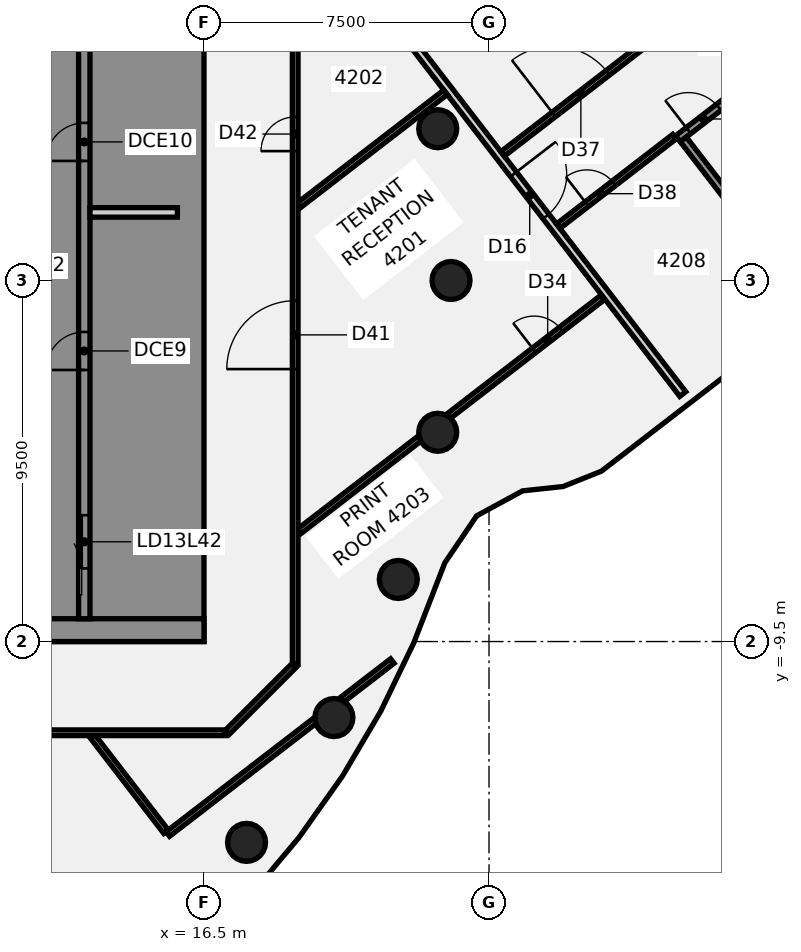
"""IFC4 building model, lengths in metres.
Left out: names, types, materials, properties, quantities, classifications, styles, units other than length and angle.
Written with IfcOpenShell. Run it as: python <this file> out.ifc"""

import sys

from ifc_helpers import new_model, si_unit, direction, frame, frame_2d, origin, origin_2d, place, context, subcontext, project, spatial, polyline, rectangle, circle, outline, extrude, element, fill, save


model = new_model("IFC4")
c1 = context("Model", 3, precision=1e-05, world=origin(), true_north=direction((0.0, 1.0)))
c2 = subcontext(c1, "Body", "Model", "MODEL_VIEW")
j1 = project(units=[si_unit("LENGTHUNIT", "METRE"), si_unit("PLANEANGLEUNIT", "RADIAN")], contexts=[c1])
p1 = place(None, origin())
s1 = spatial("IfcSite", under=j1, at=p1, CompositionType="ELEMENT")
p2 = place(p1, origin())
s2 = spatial("IfcBuilding", under=s1, at=p2, CompositionType="ELEMENT")
p3 = place(p2, frame((0.0, 0.0, 170.5)))
s3 = spatial("IfcBuildingStorey", under=s2, at=p3, CompositionType="ELEMENT", Elevation=170.5)
for number, where, z_axis, x_axis in (
    (1, (23.0, 0.0, -0.14), (0.0, 0.0, 1.0), (1.0, 0.0, 0.0)),
    (2, (22.651, 3.994, -0.14), (0.0, 0.0, 1.0), (1.0, 0.0, 0.0)),
    (3, (17.619, -14.784, -0.14), (0.0, 0.0, 1.0), (1.0, 0.0, 0.0)),
    (4, (19.919, -11.5, -0.14), (0.0, 0.0, 1.0), (1.0, 0.0, 0.0)),
    (5, (21.613, -7.866, -0.14), (0.0, 0.0, 1.0), (1.0, 0.0, 0.0)),
    (6, (22.651, -3.994, -0.14), (0.0, 0.0, 1.0), (1.0, 0.0, 0.0)),
):
    element("IfcColumn", number, at=place(p3, frame(where, z_axis=z_axis, x_axis=x_axis)), inside=s3, PredefinedType="COLUMN", context=c2, shape_type="SweptSolid", body=[
        extrude(circle(Radius=0.5, at=origin_2d()), origin(), (0.0, 0.0, 1.0), 3.75),
    ])
p4 = place(p3, frame((13.574, -12.003, 0.0), z_axis=(0.0, 0.0, 1.0), x_axis=(0.61027454424, -0.79218999025, 0.0)))
e7 = element("IfcWall", 7, at=p4, inside=s3, PredefinedType="PARTITIONING", context=c2, shape_type="SweptSolid", body=[
    extrude(rectangle(XDim=3.159, YDim=0.15, at=frame_2d((1.58, 0.0))), origin(), (0.0, 0.0, 1.0), 3.01),
])
p5 = place(p3, frame((20.409, 8.292, 0.0), z_axis=(0.0, 0.0, 1.0), x_axis=(0.610264945107, -0.792197384983, 0.0)))
e8 = element("IfcWall", 8, at=p5, inside=s3, PredefinedType="PARTITIONING", context=c2, shape_type="SweptSolid", body=[
    extrude(rectangle(XDim=14.239, YDim=0.2, at=frame_2d((7.12, 0.0))), origin(), (0.0, 0.0, 1.0), 3.01),
])
p6 = place(p5, frame((6.94, 0.0, 0.0)))
e9 = element("IfcOpeningElement", 9, at=p6, cuts=e8, PredefinedType="OPENING", context=c2, shape_type="SweptSolid", body=[
    extrude(rectangle(XDim=1.4, YDim=2.1, at=frame_2d((0.7, 1.05))), frame((0.0, 0.11, 0.0), z_axis=(0.0, -1.0, 0.0), x_axis=(1.0, 0.0, 0.0)), (0.0, 0.0, 1.0), 0.22),
])
p7 = place(p3, frame((-17.1, -11.9, 0.0), z_axis=(0.0, 0.0, 1.0), x_axis=(1.0, 0.0, 0.0)))
e10 = element("IfcWall", 10, at=p7, inside=s3, PredefinedType="PARTITIONING", context=c2, shape_type="SweptSolid", body=[
    extrude(rectangle(XDim=34.165, YDim=0.15, at=frame_2d((17.083, 0.0))), origin(), (0.0, 0.0, 1.0), 3.01),
])
p8 = place(p7, frame((9.52, 0.0, 0.0)))
e11 = element("IfcOpeningElement", 11, at=p8, cuts=e10, PredefinedType="OPENING", context=c2, shape_type="SweptSolid", body=[
    extrude(rectangle(XDim=1.8, YDim=2.1, at=frame_2d((0.9, 1.05))), frame((0.0, 0.085, 0.0), z_axis=(0.0, -1.0, 0.0), x_axis=(1.0, 0.0, 0.0)), (0.0, 0.0, 1.0), 0.17),
])
p9 = place(p7, frame((3.6, 0.0, 0.0)))
e12 = element("IfcOpeningElement", 12, at=p9, cuts=e10, PredefinedType="OPENING", context=c2, shape_type="SweptSolid", body=[
    extrude(rectangle(XDim=1.8, YDim=2.1, at=frame_2d((0.9, 1.05))), frame((0.0, 0.085, 0.0), z_axis=(0.0, -1.0, 0.0), x_axis=(1.0, 0.0, 0.0)), (0.0, 0.0, 1.0), 0.17),
])
p10 = place(p7, frame((23.862, 0.0, 0.0)))
e13 = element("IfcOpeningElement", 13, at=p10, cuts=e10, PredefinedType="OPENING", context=c2, shape_type="SweptSolid", body=[
    extrude(rectangle(XDim=1.8, YDim=2.1, at=frame_2d((0.9, 1.05))), frame((0.0, 0.085, 0.0), z_axis=(0.0, -1.0, 0.0), x_axis=(1.0, 0.0, 0.0)), (0.0, 0.0, 1.0), 0.17),
])
p11 = place(p3, frame((15.548, -14.565, 0.0), z_axis=(0.0, 0.0, 1.0), x_axis=(0.792140202804, 0.610339167269, 0.0)))
e14 = element("IfcWall", 14, at=p11, inside=s3, PredefinedType="PARTITIONING", context=c2, shape_type="SweptSolid", body=[
    extrude(rectangle(XDim=4.899, YDim=0.15, at=frame_2d((2.449, 0.0))), origin(), (0.0, 0.0, 1.0), 3.01),
])
p12 = place(p3, frame((20.118, -11.044, 0.0), z_axis=(0.0, 0.0, 1.0), x_axis=(0.792123801297, 0.610360453682, 0.0)))
e15 = element("IfcWall", 15, at=p12, inside=s3, PredefinedType="PARTITIONING", context=c2, shape_type="SweptSolid", body=[
    extrude(rectangle(XDim=1.688, YDim=0.15, at=frame_2d((0.844, 0.0))), origin(), (0.0, 0.0, 1.0), 3.01),
])
p13 = place(p3, frame((19.003, -6.602, 0.0), z_axis=(0.0, 0.0, 1.0), x_axis=(0.792101467192, 0.610389437713, 0.0)))
e16 = element("IfcWall", 16, at=p13, inside=s3, PredefinedType="PARTITIONING", context=c2, shape_type="SweptSolid", body=[
    extrude(rectangle(XDim=4.015, YDim=0.15, at=frame_2d((2.007, 0.0))), origin(), (0.0, 0.0, 1.0), 3.01),
])
p14 = place(p3, frame((22.929, -3.576, 0.0), z_axis=(0.0, 0.0, 1.0), x_axis=(0.792113813916, 0.610373415052, 0.0)))
e17 = element("IfcWall", 17, at=p14, inside=s3, PredefinedType="PARTITIONING", context=c2, shape_type="SweptSolid", body=[
    extrude(rectangle(XDim=5.126, YDim=0.15, at=frame_2d((2.563, 0.0))), origin(), (0.0, 0.0, 1.0), 3.01),
])
p15 = place(p14, frame((2.85, 0.0, 0.0)))
e18 = element("IfcOpeningElement", 18, at=p15, cuts=e17, PredefinedType="OPENING", context=c2, shape_type="SweptSolid", body=[
    extrude(rectangle(XDim=0.9, YDim=2.1, at=frame_2d((0.45, 1.05))), frame((0.0, 0.085, 0.0), z_axis=(0.0, -1.0, 0.0), x_axis=(1.0, 0.0, 0.0)), (0.0, 0.0, 1.0), 0.17),
])
p16 = place(p3, frame((19.003, 1.983, 0.0), z_axis=(0.0, 0.0, 1.0), x_axis=(0.792144175523, 0.610334011165, 0.0)))
e19 = element("IfcWall", 19, at=p16, inside=s3, PredefinedType="PARTITIONING", context=c2, shape_type="SweptSolid", body=[
    extrude(rectangle(XDim=4.864, YDim=0.15, at=frame_2d((2.432, 0.0))), origin(), (0.0, 0.0, 1.0), 3.01),
])
p17 = place(p3, frame((24.357, 3.331, 0.0), z_axis=(0.0, 0.0, 1.0), x_axis=(0.792166560138, 0.610304957378, 0.0)))
e20 = element("IfcWall", 20, at=p17, inside=s3, PredefinedType="PARTITIONING", context=c2, shape_type="SweptSolid", body=[
    extrude(rectangle(XDim=13.32, YDim=0.15, at=frame_2d((6.66, 0.0))), origin(), (0.0, 0.0, 1.0), 3.01),
])
p18 = place(p17, frame((6.799, 0.0, 0.0)))
e21 = element("IfcOpeningElement", 21, at=p18, cuts=e20, PredefinedType="OPENING", context=c2, shape_type="SweptSolid", body=[
    extrude(rectangle(XDim=0.9, YDim=2.1, at=frame_2d((0.45, 1.05))), frame((0.0, 0.085, 0.0), z_axis=(0.0, -1.0, 0.0), x_axis=(1.0, 0.0, 0.0)), (0.0, 0.0, 1.0), 0.17),
])
p19 = place(p17, frame((10.1, 0.0, 0.0)))
e22 = element("IfcOpeningElement", 22, at=p19, cuts=e20, PredefinedType="OPENING", context=c2, shape_type="SweptSolid", body=[
    extrude(rectangle(XDim=0.9, YDim=2.1, at=frame_2d((0.45, 1.05))), frame((0.0, 0.085, 0.0), z_axis=(0.0, -1.0, 0.0), x_axis=(1.0, 0.0, 0.0)), (0.0, 0.0, 1.0), 0.17),
])
p20 = place(p17, frame((1.7, 0.0, 0.0)))
e23 = element("IfcOpeningElement", 23, at=p20, cuts=e20, PredefinedType="OPENING", context=c2, shape_type="SweptSolid", body=[
    extrude(rectangle(XDim=1.8, YDim=2.1, at=frame_2d((0.9, 1.05))), frame((0.0, 0.085, 0.0), z_axis=(0.0, -1.0, 0.0), x_axis=(1.0, 0.0, 0.0)), (0.0, 0.0, 1.0), 0.17),
])
p21 = place(p3, frame((25.822, 1.43, 0.0), z_axis=(0.0, 0.0, 1.0), x_axis=(0.792113416719, 0.610373930516, 0.0)))
e24 = element("IfcWall", 24, at=p21, inside=s3, PredefinedType="PARTITIONING", context=c2, shape_type="SweptSolid", body=[
    extrude(rectangle(XDim=3.859, YDim=0.15, at=frame_2d((1.93, 0.0))), origin(), (0.0, 0.0, 1.0), 3.01),
])
p22 = place(p21, frame((0.95, 0.0, 0.0)))
e25 = element("IfcOpeningElement", 25, at=p22, cuts=e24, PredefinedType="OPENING", context=c2, shape_type="SweptSolid", body=[
    extrude(rectangle(XDim=0.9, YDim=2.1, at=frame_2d((0.45, 1.05))), frame((0.0, 0.085, 0.0), z_axis=(0.0, -1.0, 0.0), x_axis=(1.0, 0.0, 0.0)), (0.0, 0.0, 1.0), 0.17),
])
p23 = place(p3, frame((17.1, -11.9, 0.0), z_axis=(0.0, 0.0, 1.0), x_axis=(0.707106781187, 0.707106781187, 0.0)))
e26 = element("IfcWall", 26, at=p23, inside=s3, PredefinedType="PARTITIONING", context=c2, shape_type="SweptSolid", body=[
    extrude(rectangle(XDim=2.505, YDim=0.15, at=frame_2d((1.253, 0.0))), origin(), (0.0, 0.0, 1.0), 3.01),
])
p24 = place(p3, frame((18.9, -10.1, 0.0), z_axis=(0.0, 0.0, 1.0), x_axis=(0.0, 1.0, 0.0)))
e27 = element("IfcWall", 27, at=p24, inside=s3, PredefinedType="PARTITIONING", context=c2, shape_type="SweptSolid", body=[
    extrude(rectangle(XDim=20.2, YDim=0.15, at=frame_2d((10.1, 0.0))), origin(), (0.0, 0.0, 1.0), 3.01),
])
p25 = place(p24, frame((7.769, 0.0, 0.0)))
e28 = element("IfcOpeningElement", 28, at=p25, cuts=e27, PredefinedType="OPENING", context=c2, shape_type="SweptSolid", body=[
    extrude(rectangle(XDim=1.8, YDim=2.1, at=frame_2d((0.9, 1.05))), frame((0.0, 0.085, 0.0), z_axis=(0.0, -1.0, 0.0), x_axis=(1.0, 0.0, 0.0)), (0.0, 0.0, 1.0), 0.17),
])
p26 = place(p24, frame((13.504, 0.0, 0.0)))
e29 = element("IfcOpeningElement", 29, at=p26, cuts=e27, PredefinedType="OPENING", context=c2, shape_type="SweptSolid", body=[
    extrude(rectangle(XDim=0.9, YDim=2.1, at=frame_2d((0.45, 1.05))), frame((0.0, 0.085, 0.0), z_axis=(0.0, -1.0, 0.0), x_axis=(1.0, 0.0, 0.0)), (0.0, 0.0, 1.0), 0.17),
])
p27 = place(p3, frame((16.5, -9.2, 0.0), z_axis=(0.0, 0.0, 1.0), x_axis=(-1.0, 0.0, 0.0)))
e30 = element("IfcWall", 30, at=p27, inside=s3, PredefinedType="SHEAR", context=c2, shape_type="SweptSolid", body=[
    extrude(rectangle(XDim=13.0, YDim=0.6, at=frame_2d((6.5, 0.0))), origin(), (0.0, 0.0, 1.0), 3.61),
])
p28 = place(p27, frame((4.15, 0.0, 0.0)))
e31 = element("IfcOpeningElement", 31, at=p28, cuts=e30, PredefinedType="OPENING", context=c2, shape_type="SweptSolid", body=[
    extrude(rectangle(XDim=1.4, YDim=2.1, at=frame_2d((0.7, 1.05))), frame((0.0, 0.31, 0.0), z_axis=(0.0, -1.0, 0.0), x_axis=(1.0, 0.0, 0.0)), (0.0, 0.0, 1.0), 0.62),
])
p29 = place(p27, frame((10.125, 0.0, 0.0)))
e32 = element("IfcOpeningElement", 32, at=p29, cuts=e30, PredefinedType="OPENING", context=c2, shape_type="SweptSolid", body=[
    extrude(rectangle(XDim=1.4, YDim=2.1, at=frame_2d((0.7, 1.05))), frame((0.0, 0.31, 0.0), z_axis=(0.0, -1.0, 0.0), x_axis=(1.0, 0.0, 0.0)), (0.0, 0.0, 1.0), 0.62),
])
p30 = place(p3, origin())
e33 = element("IfcWall", 33, at=p30, inside=s3, PredefinedType="SHEAR", context=c2, shape_type="SweptSolid", body=[
    extrude(outline(polyline([(13.5, -8.125), (13.5, -8.9), (15.9, -8.9), (16.5, -8.9), (16.5, 8.9), (15.9, 8.9), (13.5, 8.9), (13.5, 8.125), (15.9, 8.125), (15.9, 5.625), (13.5, 5.625), (13.5, 5.375), (15.9, 5.375), (15.9, -5.375), (13.5, -5.375), (13.5, -5.625), (15.9, -5.625), (15.9, -8.125), (13.5, -8.125)])), origin(), (0.0, 0.0, 1.0), 3.61),
])
p31 = place(p3, frame((13.35, -8.9, 0.0), z_axis=(0.0, 0.0, 1.0), x_axis=(0.0, 1.0, 0.0)))
e34 = element("IfcWall", 34, at=p31, inside=s3, PredefinedType="SHEAR", context=c2, shape_type="SweptSolid", body=[
    extrude(rectangle(XDim=17.8, YDim=0.3, at=frame_2d((8.9, 0.0))), origin(), (0.0, 0.0, 1.0), 3.61),
])
p32 = place(p31, frame((1.325, 0.0, 0.0)))
e35 = element("IfcOpeningElement", 35, at=p32, cuts=e34, PredefinedType="OPENING", context=c2, shape_type="SweptSolid", body=[
    extrude(rectangle(XDim=1.4, YDim=2.1, at=frame_2d((0.7, 1.05))), frame((0.0, 0.16, 0.0), z_axis=(0.0, -1.0, 0.0), x_axis=(1.0, 0.0, 0.0)), (0.0, 0.0, 1.0), 0.32),
])
p33 = place(p31, frame((6.546, 0.0, 0.0)))
e36 = element("IfcOpeningElement", 36, at=p33, cuts=e34, PredefinedType="OPENING", context=c2, shape_type="SweptSolid", body=[
    extrude(rectangle(XDim=1.0, YDim=2.1, at=frame_2d((0.5, 1.05))), frame((0.0, 0.16, 0.0), z_axis=(0.0, -1.0, 0.0), x_axis=(1.0, 0.0, 0.0)), (0.0, 0.0, 1.0), 0.32),
])
p34 = place(p31, frame((12.046, 0.0, 0.0)))
e37 = element("IfcOpeningElement", 37, at=p34, cuts=e34, PredefinedType="OPENING", context=c2, shape_type="SweptSolid", body=[
    extrude(rectangle(XDim=1.0, YDim=2.1, at=frame_2d((0.5, 1.05))), frame((0.0, 0.16, 0.0), z_axis=(0.0, -1.0, 0.0), x_axis=(1.0, 0.0, 0.0)), (0.0, 0.0, 1.0), 0.32),
])
p35 = place(p3, frame((15.8, 1.792, 0.0), z_axis=(0.0, 0.0, 1.0), x_axis=(-1.0, 0.0, 0.0)))
e38 = element("IfcWall", 38, at=p35, inside=s3, PredefinedType="PARTITIONING", context=c2, shape_type="SweptSolid", body=[
    extrude(rectangle(XDim=2.3, YDim=0.25, at=frame_2d((1.15, 0.0))), origin(), (0.0, 0.0, 1.0), 3.61),
])
p36 = place(p3, frame((28.972, 3.731, -0.14), z_axis=(0.0, 0.0, 1.0), x_axis=(0.792153700274, 0.610321648921, 0.0)))
e39 = element("IfcWall", 39, at=p36, inside=s3, PredefinedType="SHEAR", context=c2, shape_type="SweptSolid", body=[
    extrude(rectangle(XDim=6.7, YDim=0.2, at=frame_2d((3.35, 0.0))), origin(), (0.0, 0.0, 1.0), 3.15),
])
p37 = place(p36, frame((0.35, 0.0, 0.0)))
e40 = element("IfcOpeningElement", 40, at=p37, cuts=e39, PredefinedType="OPENING", context=c2, shape_type="SweptSolid", body=[
    extrude(rectangle(XDim=1.0, YDim=2.1, at=frame_2d((0.5, 1.05))), frame((0.0, 0.11, 0.0), z_axis=(0.0, -1.0, 0.0), x_axis=(1.0, 0.0, 0.0)), (0.0, 0.0, 1.0), 0.22),
])
p38 = place(p3, frame((31.065, 1.177, -0.14), z_axis=(0.0, 0.0, 1.0), x_axis=(-0.610289481398, 0.792178482979, 0.0)))
e41 = element("IfcWall", 41, at=p38, inside=s3, PredefinedType="SHEAR", context=c2, shape_type="SweptSolid", body=[
    extrude(rectangle(XDim=3.2, YDim=0.2, at=frame_2d((1.6, 0.0))), origin(), (0.0, 0.0, 1.0), 3.15),
])
p39 = place(p6, frame((1.4, 0.0, 0.0), z_axis=(0.0, 0.0, 1.0), x_axis=(-1.0, 0.0, 0.0)))
e42 = element("IfcDoor", 42, at=p39, inside=s3, OperationType="DOUBLE_DOOR_SINGLE_SWING", PredefinedType="DOOR", context=c2, shape_type="SweptSolid", body=[
    extrude(rectangle(XDim=1.4, YDim=2.1, at=frame_2d((0.7, 1.05))), frame((0.0, 0.025, 0.0), z_axis=(0.0, -1.0, 0.0), x_axis=(1.0, 0.0, 0.0)), (0.0, 0.0, 1.0), 0.05),
])
fill(e9, e42)
p40 = place(p15, frame((0.9, 0.0, 0.0), z_axis=(0.0, 0.0, 1.0), x_axis=(-1.0, 0.0, 0.0)))
e43 = element("IfcDoor", 43, at=p40, inside=s3, OperationType="SINGLE_SWING_RIGHT", PredefinedType="DOOR", context=c2, shape_type="SweptSolid", body=[
    extrude(rectangle(XDim=0.9, YDim=2.1, at=frame_2d((0.45, 1.05))), frame((0.0, 0.025, 0.0), z_axis=(0.0, -1.0, 0.0), x_axis=(1.0, 0.0, 0.0)), (0.0, 0.0, 1.0), 0.05),
])
fill(e18, e43)
p41 = place(p20, origin())
e44 = element("IfcDoor", 44, at=p41, inside=s3, OperationType="DOUBLE_DOOR_SINGLE_SWING", PredefinedType="DOOR", context=c2, shape_type="SweptSolid", body=[
    extrude(rectangle(XDim=1.8, YDim=2.1, at=frame_2d((0.9, 1.05))), frame((0.0, 0.025, 0.0), z_axis=(0.0, -1.0, 0.0), x_axis=(1.0, 0.0, 0.0)), (0.0, 0.0, 1.0), 0.05),
])
fill(e23, e44)
p42 = place(p22, frame((0.9, 0.0, 0.0), z_axis=(0.0, 0.0, 1.0), x_axis=(-1.0, 0.0, 0.0)))
e45 = element("IfcDoor", 45, at=p42, inside=s3, OperationType="SINGLE_SWING_LEFT", PredefinedType="DOOR", context=c2, shape_type="SweptSolid", body=[
    extrude(rectangle(XDim=0.9, YDim=2.1, at=frame_2d((0.45, 1.05))), frame((0.0, 0.025, 0.0), z_axis=(0.0, -1.0, 0.0), x_axis=(1.0, 0.0, 0.0)), (0.0, 0.0, 1.0), 0.05),
])
fill(e25, e45)
p43 = place(p25, origin())
e46 = element("IfcDoor", 46, at=p43, inside=s3, OperationType="DOUBLE_DOOR_SINGLE_SWING", PredefinedType="DOOR", context=c2, shape_type="SweptSolid", body=[
    extrude(rectangle(XDim=1.8, YDim=2.1, at=frame_2d((0.9, 1.05))), frame((0.0, 0.025, 0.0), z_axis=(0.0, -1.0, 0.0), x_axis=(1.0, 0.0, 0.0)), (0.0, 0.0, 1.0), 0.05),
])
fill(e28, e46)
p44 = place(p26, frame((0.9, 0.0, 0.0), z_axis=(0.0, 0.0, 1.0), x_axis=(-1.0, 0.0, 0.0)))
e47 = element("IfcDoor", 47, at=p44, inside=s3, OperationType="SINGLE_SWING_RIGHT", PredefinedType="DOOR", context=c2, shape_type="SweptSolid", body=[
    extrude(rectangle(XDim=0.9, YDim=2.1, at=frame_2d((0.45, 1.05))), frame((0.0, 0.025, 0.0), z_axis=(0.0, -1.0, 0.0), x_axis=(1.0, 0.0, 0.0)), (0.0, 0.0, 1.0), 0.05),
])
fill(e29, e47)
p45 = place(p32, origin())
e48 = element("IfcDoor", 48, at=p45, inside=s3, OperationType="SLIDING_TO_LEFT", PredefinedType="DOOR", context=c2, shape_type="SweptSolid", body=[
    extrude(rectangle(XDim=1.4, YDim=2.1, at=frame_2d((0.7, 1.05))), frame((0.0, 0.025, 0.0), z_axis=(0.0, -1.0, 0.0), x_axis=(1.0, 0.0, 0.0)), (0.0, 0.0, 1.0), 0.05),
])
fill(e35, e48)
p46 = place(p33, origin())
e49 = element("IfcDoor", 49, at=p46, inside=s3, OperationType="SINGLE_SWING_LEFT", PredefinedType="DOOR", context=c2, shape_type="SweptSolid", body=[
    extrude(rectangle(XDim=1.0, YDim=2.1, at=frame_2d((0.5, 1.05))), frame((0.0, 0.025, 0.0), z_axis=(0.0, -1.0, 0.0), x_axis=(1.0, 0.0, 0.0)), (0.0, 0.0, 1.0), 0.05),
])
fill(e36, e49)
p47 = place(p34, origin())
e50 = element("IfcDoor", 50, at=p47, inside=s3, OperationType="SINGLE_SWING_LEFT", PredefinedType="DOOR", context=c2, shape_type="SweptSolid", body=[
    extrude(rectangle(XDim=1.0, YDim=2.1, at=frame_2d((0.5, 1.05))), frame((0.0, 0.025, 0.0), z_axis=(0.0, -1.0, 0.0), x_axis=(1.0, 0.0, 0.0)), (0.0, 0.0, 1.0), 0.05),
])
fill(e37, e50)
p48 = place(p37, origin())
e51 = element("IfcDoor", 51, at=p48, inside=s3, OperationType="SINGLE_SWING_LEFT", PredefinedType="DOOR", context=c2, shape_type="SweptSolid", body=[
    extrude(rectangle(XDim=1.0, YDim=2.1, at=frame_2d((0.5, 1.05))), frame((0.0, 0.025, 0.0), z_axis=(0.0, -1.0, 0.0), x_axis=(1.0, 0.0, 0.0)), (0.0, 0.0, 1.0), 0.05),
])
fill(e40, e51)
save(model, sys.argv[1])
